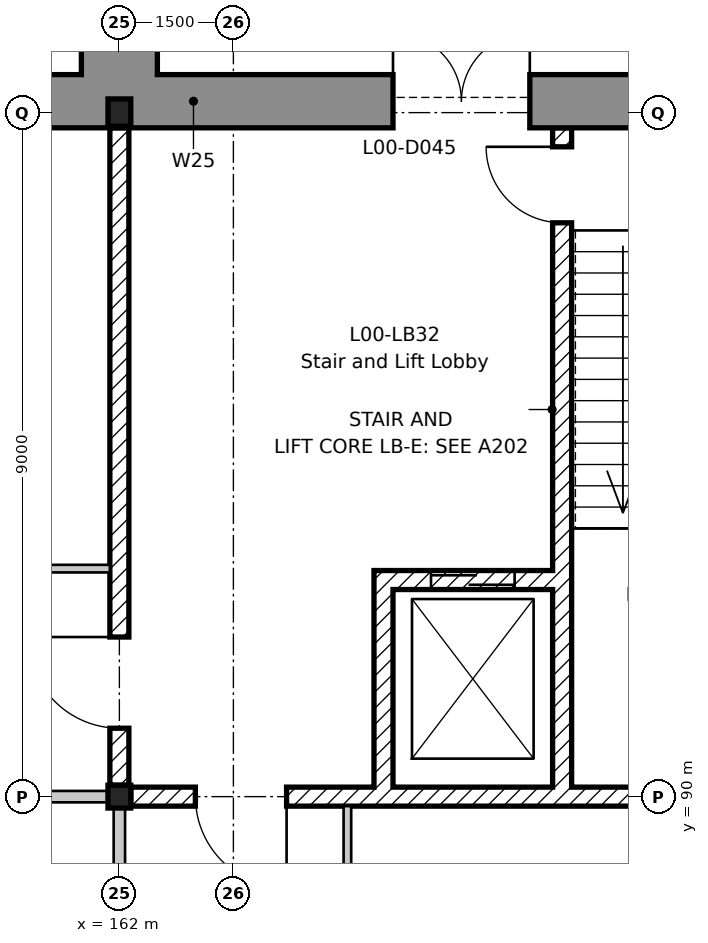
"""IFC4 building model, lengths in metres.
Left out: names, types, materials, properties, quantities, classifications, styles, units other than length and angle.
Written with IfcOpenShell. Run it as: python <this file> out.ifc"""

import sys

from ifc_helpers import new_model, si_unit, direction, frame, frame_2d, origin, origin_2d, place, context, subcontext, project, spatial, rectangle, i_section, extrude, element, fill, save


model = new_model("IFC4")
c1 = context("Model", 3, precision=1e-05, world=origin(), true_north=direction((0.0, 1.0)))
c2 = subcontext(c1, "Body", "Model", "MODEL_VIEW")
j1 = project(units=[si_unit("LENGTHUNIT", "METRE"), si_unit("PLANEANGLEUNIT", "RADIAN")], contexts=[c1])
p1 = place(None, origin())
s1 = spatial("IfcSite", under=j1, at=p1, CompositionType="ELEMENT")
p2 = place(p1, origin())
s2 = spatial("IfcBuilding", under=s1, at=p2, CompositionType="ELEMENT")
p3 = place(p2, origin())
s3 = spatial("IfcBuildingStorey", under=s2, at=p3, CompositionType="ELEMENT", Elevation=0.0)
p4 = place(p3, frame((162.0, 90.0, -0.6), z_axis=(0.0, 0.0, 1.0), x_axis=(1.0, 0.0, 0.0)))
e1 = element("IfcColumn", 1, at=p4, inside=s3, PredefinedType="COLUMN", context=c2, shape_type="SweptSolid", body=[
    extrude(i_section(OverallWidth=0.3, OverallDepth=0.3, WebThickness=0.011, FlangeThickness=0.019, FilletRadius=0.027, at=origin_2d()), origin(), (0.0, 0.0, 1.0), 5.8),
])
p5 = place(p3, frame((162.0, 99.0, -0.6), z_axis=(0.0, 0.0, 1.0), x_axis=(1.0, 0.0, 0.0)))
e2 = element("IfcColumn", 2, at=p5, inside=s3, PredefinedType="COLUMN", context=c2, shape_type="SweptSolid", body=[
    extrude(i_section(OverallWidth=0.3, OverallDepth=0.36, WebThickness=0.012, FlangeThickness=0.022, FilletRadius=0.027, at=origin_2d()), origin(), (0.0, 0.0, 1.0), 5.8),
])
p6 = place(p3, frame((167.825, 98.8, 0.0), z_axis=(0.0, 0.0, 1.0), x_axis=(0.0, -1.0, 0.0)))
e3 = element("IfcWall", 3, at=p6, inside=s3, PredefinedType="SHEAR", context=c2, shape_type="SweptSolid", body=[
    extrude(rectangle(XDim=8.675, YDim=0.25, at=frame_2d((4.337, 0.0))), origin(), (0.0, 0.0, 1.0), 5.2),
])
p7 = place(p6, frame((0.25, 0.0, 0.0)))
e4 = element("IfcOpeningElement", 4, at=p7, cuts=e3, PredefinedType="OPENING", context=c2, shape_type="SweptSolid", body=[
    extrude(rectangle(XDim=1.0, YDim=2.1, at=frame_2d((0.5, 1.05))), frame((0.0, 0.135, 0.0), z_axis=(0.0, -1.0, 0.0), x_axis=(1.0, 0.0, 0.0)), (0.0, 0.0, 1.0), 0.27),
])
p8 = place(p3, frame((162.0, 98.8, 0.0), z_axis=(0.0, 0.0, 1.0), x_axis=(0.0, -1.0, 0.0)))
e5 = element("IfcWall", 5, at=p8, inside=s3, PredefinedType="SHEAR", context=c2, shape_type="SweptSolid", body=[
    extrude(rectangle(XDim=8.65, YDim=0.25, at=frame_2d((4.325, 0.0))), origin(), (0.0, 0.0, 1.0), 5.2),
])
p9 = place(p8, frame((6.7, 0.0, 0.0)))
e6 = element("IfcOpeningElement", 6, at=p9, cuts=e5, PredefinedType="OPENING", context=c2, shape_type="SweptSolid", body=[
    extrude(rectangle(XDim=1.2, YDim=2.1, at=frame_2d((0.6, 1.05))), frame((0.0, 0.135, 0.0), z_axis=(0.0, -1.0, 0.0), x_axis=(1.0, 0.0, 0.0)), (0.0, 0.0, 1.0), 0.27),
])
p10 = place(p3, frame((170.8, 90.0, 0.0), z_axis=(0.0, 0.0, 1.0), x_axis=(-1.0, 0.0, 0.0)))
e7 = element("IfcWall", 7, at=p10, inside=s3, PredefinedType="SHEAR", context=c2, shape_type="SweptSolid", body=[
    extrude(rectangle(XDim=8.65, YDim=0.25, at=frame_2d((4.325, 0.0))), origin(), (0.0, 0.0, 1.0), 5.2),
])
p11 = place(p10, frame((6.6, 0.0, 0.0)))
e8 = element("IfcOpeningElement", 8, at=p11, cuts=e7, PredefinedType="OPENING", context=c2, shape_type="SweptSolid", body=[
    extrude(rectangle(XDim=1.2, YDim=2.1, at=frame_2d((0.6, 1.05))), frame((0.0, 0.135, 0.0), z_axis=(0.0, -1.0, 0.0), x_axis=(1.0, 0.0, 0.0)), (0.0, 0.0, 1.0), 0.27),
])
p12 = place(p3, frame((167.7, 92.85, 0.0), z_axis=(0.0, 0.0, 1.0), x_axis=(-1.0, 0.0, 0.0)))
e9 = element("IfcWall", 9, at=p12, inside=s3, PredefinedType="SHEAR", context=c2, shape_type="SweptSolid", body=[
    extrude(rectangle(XDim=2.35, YDim=0.25, at=frame_2d((1.175, 0.0))), origin(), (0.0, 0.0, 1.0), 5.2),
])
p13 = place(p12, frame((0.5, 0.0, 0.0)))
e10 = element("IfcOpeningElement", 10, at=p13, cuts=e9, PredefinedType="OPENING", context=c2, shape_type="SweptSolid", body=[
    extrude(rectangle(XDim=1.1, YDim=2.1, at=frame_2d((0.55, 1.05))), frame((0.0, 0.135, 0.0), z_axis=(0.0, -1.0, 0.0), x_axis=(1.0, 0.0, 0.0)), (0.0, 0.0, 1.0), 0.27),
])
p14 = place(p3, frame((165.475, 92.725, 0.0), z_axis=(0.0, 0.0, 1.0), x_axis=(0.0, -1.0, 0.0)))
e11 = element("IfcWall", 11, at=p14, inside=s3, PredefinedType="SHEAR", context=c2, shape_type="SweptSolid", body=[
    extrude(rectangle(XDim=2.6, YDim=0.25, at=frame_2d((1.3, 0.0))), origin(), (0.0, 0.0, 1.0), 5.2),
])
p15 = place(p3, frame((167.7, 92.85, -1.2), z_axis=(0.0, 0.0, 1.0), x_axis=(-1.0, 0.0, 0.0)))
e12 = element("IfcWall", 12, at=p15, inside=s3, PredefinedType="SHEAR", context=c2, shape_type="SweptSolid", body=[
    extrude(rectangle(XDim=2.35, YDim=0.25, at=frame_2d((1.175, 0.0))), origin(), (0.0, 0.0, 1.0), 1.2),
])
for number, where, z_axis, x_axis in (
    (13, (165.475, 92.975, -1.2), (0.0, 0.0, 1.0), (0.0, -1.0, 0.0)),
    (14, (167.825, 92.975, -1.2), (0.0, 0.0, 1.0), (0.0, -1.0, 0.0)),
):
    element("IfcWall", number, at=place(p3, frame(where, z_axis=z_axis, x_axis=x_axis)), inside=s3, PredefinedType="SHEAR", context=c2, shape_type="SweptSolid", body=[
        extrude(rectangle(XDim=2.85, YDim=0.25, at=frame_2d((1.425, 0.0))), origin(), (0.0, 0.0, 1.0), 1.2),
    ])
p16 = place(p3, frame((167.95, 90.0, -1.2), z_axis=(0.0, 0.0, 1.0), x_axis=(-1.0, 0.0, 0.0)))
e15 = element("IfcWall", 15, at=p16, inside=s3, PredefinedType="SHEAR", context=c2, shape_type="SweptSolid", body=[
    extrude(rectangle(XDim=2.6, YDim=0.25, at=frame_2d((1.3, 0.0))), origin(), (0.0, 0.0, 1.0), 1.2),
])
p17 = place(p3, frame((116.5, 99.15, 0.0), z_axis=(0.0, 0.0, 1.0), x_axis=(1.0, 0.0, 0.0)))
e16 = element("IfcWall", 16, at=p17, inside=s3, PredefinedType="STANDARD", context=c2, shape_type="SweptSolid", body=[
    extrude(rectangle(XDim=55.0, YDim=0.7, at=frame_2d((27.5, 0.0))), origin(), (0.0, 0.0, 1.0), 5.2),
])
p18 = place(p17, frame((2.15, 0.0, 1.2)))
e17 = element("IfcOpeningElement", 17, at=p18, cuts=e16, PredefinedType="OPENING", context=c2, shape_type="SweptSolid", body=[
    extrude(rectangle(XDim=1.2, YDim=1.8, at=frame_2d((0.6, 0.9))), frame((0.0, 0.36, 0.0), z_axis=(0.0, -1.0, 0.0), x_axis=(1.0, 0.0, 0.0)), (0.0, 0.0, 1.0), 0.72),
])
p19 = place(p17, frame((6.65, 0.0, 1.2)))
e18 = element("IfcOpeningElement", 18, at=p19, cuts=e16, PredefinedType="OPENING", context=c2, shape_type="SweptSolid", body=[
    extrude(rectangle(XDim=1.2, YDim=1.8, at=frame_2d((0.6, 0.9))), frame((0.0, 0.36, 0.0), z_axis=(0.0, -1.0, 0.0), x_axis=(1.0, 0.0, 0.0)), (0.0, 0.0, 1.0), 0.72),
])
p20 = place(p17, frame((11.15, 0.0, 1.2)))
e19 = element("IfcOpeningElement", 19, at=p20, cuts=e16, PredefinedType="OPENING", context=c2, shape_type="SweptSolid", body=[
    extrude(rectangle(XDim=1.2, YDim=1.8, at=frame_2d((0.6, 0.9))), frame((0.0, 0.36, 0.0), z_axis=(0.0, -1.0, 0.0), x_axis=(1.0, 0.0, 0.0)), (0.0, 0.0, 1.0), 0.72),
])
p21 = place(p17, frame((15.65, 0.0, 1.2)))
e20 = element("IfcOpeningElement", 20, at=p21, cuts=e16, PredefinedType="OPENING", context=c2, shape_type="SweptSolid", body=[
    extrude(rectangle(XDim=1.2, YDim=1.8, at=frame_2d((0.6, 0.9))), frame((0.0, 0.36, 0.0), z_axis=(0.0, -1.0, 0.0), x_axis=(1.0, 0.0, 0.0)), (0.0, 0.0, 1.0), 0.72),
])
p22 = place(p17, frame((20.15, 0.0, 1.2)))
e21 = element("IfcOpeningElement", 21, at=p22, cuts=e16, PredefinedType="OPENING", context=c2, shape_type="SweptSolid", body=[
    extrude(rectangle(XDim=1.2, YDim=1.8, at=frame_2d((0.6, 0.9))), frame((0.0, 0.36, 0.0), z_axis=(0.0, -1.0, 0.0), x_axis=(1.0, 0.0, 0.0)), (0.0, 0.0, 1.0), 0.72),
])
p23 = place(p17, frame((24.65, 0.0, 1.2)))
e22 = element("IfcOpeningElement", 22, at=p23, cuts=e16, PredefinedType="OPENING", context=c2, shape_type="SweptSolid", body=[
    extrude(rectangle(XDim=1.2, YDim=1.8, at=frame_2d((0.6, 0.9))), frame((0.0, 0.36, 0.0), z_axis=(0.0, -1.0, 0.0), x_axis=(1.0, 0.0, 0.0)), (0.0, 0.0, 1.0), 0.72),
])
p24 = place(p17, frame((29.15, 0.0, 1.2)))
e23 = element("IfcOpeningElement", 23, at=p24, cuts=e16, PredefinedType="OPENING", context=c2, shape_type="SweptSolid", body=[
    extrude(rectangle(XDim=1.2, YDim=1.8, at=frame_2d((0.6, 0.9))), frame((0.0, 0.36, 0.0), z_axis=(0.0, -1.0, 0.0), x_axis=(1.0, 0.0, 0.0)), (0.0, 0.0, 1.0), 0.72),
])
p25 = place(p17, frame((33.65, 0.0, 1.2)))
e24 = element("IfcOpeningElement", 24, at=p25, cuts=e16, PredefinedType="OPENING", context=c2, shape_type="SweptSolid", body=[
    extrude(rectangle(XDim=1.2, YDim=1.8, at=frame_2d((0.6, 0.9))), frame((0.0, 0.36, 0.0), z_axis=(0.0, -1.0, 0.0), x_axis=(1.0, 0.0, 0.0)), (0.0, 0.0, 1.0), 0.72),
])
p26 = place(p17, frame((38.15, 0.0, 1.2)))
e25 = element("IfcOpeningElement", 25, at=p26, cuts=e16, PredefinedType="OPENING", context=c2, shape_type="SweptSolid", body=[
    extrude(rectangle(XDim=1.2, YDim=1.8, at=frame_2d((0.6, 0.9))), frame((0.0, 0.36, 0.0), z_axis=(0.0, -1.0, 0.0), x_axis=(1.0, 0.0, 0.0)), (0.0, 0.0, 1.0), 0.72),
])
p27 = place(p17, frame((42.65, 0.0, 1.2)))
e26 = element("IfcOpeningElement", 26, at=p27, cuts=e16, PredefinedType="OPENING", context=c2, shape_type="SweptSolid", body=[
    extrude(rectangle(XDim=1.2, YDim=1.8, at=frame_2d((0.6, 0.9))), frame((0.0, 0.36, 0.0), z_axis=(0.0, -1.0, 0.0), x_axis=(1.0, 0.0, 0.0)), (0.0, 0.0, 1.0), 0.72),
])
p28 = place(p17, frame((49.1, 0.0, 0.0)))
e27 = element("IfcOpeningElement", 27, at=p28, cuts=e16, PredefinedType="OPENING", context=c2, shape_type="SweptSolid", body=[
    extrude(rectangle(XDim=1.8, YDim=2.1, at=frame_2d((0.9, 1.05))), frame((0.0, 0.36, 0.0), z_axis=(0.0, -1.0, 0.0), x_axis=(1.0, 0.0, 0.0)), (0.0, 0.0, 1.0), 0.72),
])
p29 = place(p3, frame((161.5, 100.1, 0.0), z_axis=(0.0, 0.0, 1.0), x_axis=(1.0, 0.0, 0.0)))
e28 = element("IfcWall", 28, at=p29, inside=s3, PredefinedType="STANDARD", context=c2, shape_type="SweptSolid", body=[
    extrude(rectangle(XDim=1.0, YDim=1.2, at=frame_2d((0.5, 0.0))), origin(), (0.0, 0.0, 1.0), 5.4),
])
p30 = place(p3, frame((153.15, 90.0, 0.0), z_axis=(0.0, 0.0, 1.0), x_axis=(1.0, 0.0, 0.0)))
e29 = element("IfcWall", 29, at=p30, inside=s3, PredefinedType="PARTITIONING", context=c2, shape_type="SweptSolid", body=[
    extrude(rectangle(XDim=8.7, YDim=0.15, at=frame_2d((4.35, 0.0))), origin(), (0.0, 0.0, 1.0), 4.68),
])
p31 = place(p3, frame((150.0, 93.0, 0.0), z_axis=(0.0, 0.0, 1.0), x_axis=(1.0, 0.0, 0.0)))
e30 = element("IfcWall", 30, at=p31, inside=s3, PredefinedType="PARTITIONING", context=c2, shape_type="SweptSolid", body=[
    extrude(rectangle(XDim=11.875, YDim=0.1, at=frame_2d((5.938, 0.0))), origin(), (0.0, 0.0, 1.0), 4.68),
])
p32 = place(p31, frame((5.4, 0.0, 0.0)))
e31 = element("IfcOpeningElement", 31, at=p32, cuts=e30, PredefinedType="OPENING", context=c2, shape_type="SweptSolid", body=[
    extrude(rectangle(XDim=1.2, YDim=2.1, at=frame_2d((0.6, 1.05))), frame((0.0, 0.06, 0.0), z_axis=(0.0, -1.0, 0.0), x_axis=(1.0, 0.0, 0.0)), (0.0, 0.0, 1.0), 0.12),
])
p33 = place(p3, frame((162.0, 87.075, 0.0), z_axis=(0.0, 0.0, 1.0), x_axis=(0.0, 1.0, 0.0)))
e32 = element("IfcWall", 32, at=p33, inside=s3, PredefinedType="PARTITIONING", context=c2, shape_type="SweptSolid", body=[
    extrude(rectangle(XDim=2.775, YDim=0.15, at=frame_2d((1.388, 0.0))), origin(), (0.0, 0.0, 1.0), 4.68),
])
p34 = place(p3, frame((165.0, 81.075, 0.0), z_axis=(0.0, 0.0, 1.0), x_axis=(0.0, 1.0, 0.0)))
e33 = element("IfcWall", 33, at=p34, inside=s3, PredefinedType="PARTITIONING", context=c2, shape_type="SweptSolid", body=[
    extrude(rectangle(XDim=8.8, YDim=0.1, at=frame_2d((4.4, 0.0))), origin(), (0.0, 0.0, 1.0), 4.68),
])
p35 = place(p34, frame((3.925, 0.0, 0.0)))
e34 = element("IfcOpeningElement", 34, at=p35, cuts=e33, PredefinedType="OPENING", context=c2, shape_type="SweptSolid", body=[
    extrude(rectangle(XDim=1.0, YDim=2.1, at=frame_2d((0.5, 1.05))), frame((0.0, 0.06, 0.0), z_axis=(0.0, -1.0, 0.0), x_axis=(1.0, 0.0, 0.0)), (0.0, 0.0, 1.0), 0.12),
])
p36 = place(p28, origin())
e35 = element("IfcDoor", 35, at=p36, inside=s3, OperationType="DOUBLE_DOOR_SINGLE_SWING", PredefinedType="DOOR", context=c2, shape_type="SweptSolid", body=[
    extrude(rectangle(XDim=1.8, YDim=2.1, at=frame_2d((0.9, 1.05))), frame((0.0, 0.025, 0.0), z_axis=(0.0, -1.0, 0.0), x_axis=(1.0, 0.0, 0.0)), (0.0, 0.0, 1.0), 0.05),
])
fill(e27, e35)
p37 = place(p7, frame((1.0, 0.0, 0.0), z_axis=(0.0, 0.0, 1.0), x_axis=(-1.0, 0.0, 0.0)))
e36 = element("IfcDoor", 36, at=p37, inside=s3, OperationType="SINGLE_SWING_RIGHT", PredefinedType="DOOR", context=c2, shape_type="SweptSolid", body=[
    extrude(rectangle(XDim=1.0, YDim=2.1, at=frame_2d((0.5, 1.05))), frame((0.0, 0.025, 0.0), z_axis=(0.0, -1.0, 0.0), x_axis=(1.0, 0.0, 0.0)), (0.0, 0.0, 1.0), 0.05),
])
fill(e4, e36)
p38 = place(p13, origin())
e37 = element("IfcDoor", 37, at=p38, inside=s3, OperationType="SLIDING_TO_LEFT", PredefinedType="DOOR", context=c2, shape_type="SweptSolid", body=[
    extrude(rectangle(XDim=1.1, YDim=2.1, at=frame_2d((0.55, 1.05))), frame((0.0, 0.025, 0.0), z_axis=(0.0, -1.0, 0.0), x_axis=(1.0, 0.0, 0.0)), (0.0, 0.0, 1.0), 0.05),
])
fill(e10, e37)
p39 = place(p11, origin())
e38 = element("IfcDoor", 38, at=p39, inside=s3, OperationType="SINGLE_SWING_LEFT", PredefinedType="DOOR", context=c2, shape_type="SweptSolid", body=[
    extrude(rectangle(XDim=1.2, YDim=2.1, at=frame_2d((0.6, 1.05))), frame((0.0, 0.025, 0.0), z_axis=(0.0, -1.0, 0.0), x_axis=(1.0, 0.0, 0.0)), (0.0, 0.0, 1.0), 0.05),
])
fill(e8, e38)
p40 = place(p9, frame((1.2, 0.0, 0.0), z_axis=(0.0, 0.0, 1.0), x_axis=(-1.0, 0.0, 0.0)))
e39 = element("IfcDoor", 39, at=p40, inside=s3, OperationType="SINGLE_SWING_RIGHT", PredefinedType="DOOR", context=c2, shape_type="SweptSolid", body=[
    extrude(rectangle(XDim=1.2, YDim=2.1, at=frame_2d((0.6, 1.05))), frame((0.0, 0.025, 0.0), z_axis=(0.0, -1.0, 0.0), x_axis=(1.0, 0.0, 0.0)), (0.0, 0.0, 1.0), 0.05),
])
fill(e6, e39)
save(model, sys.argv[1])
